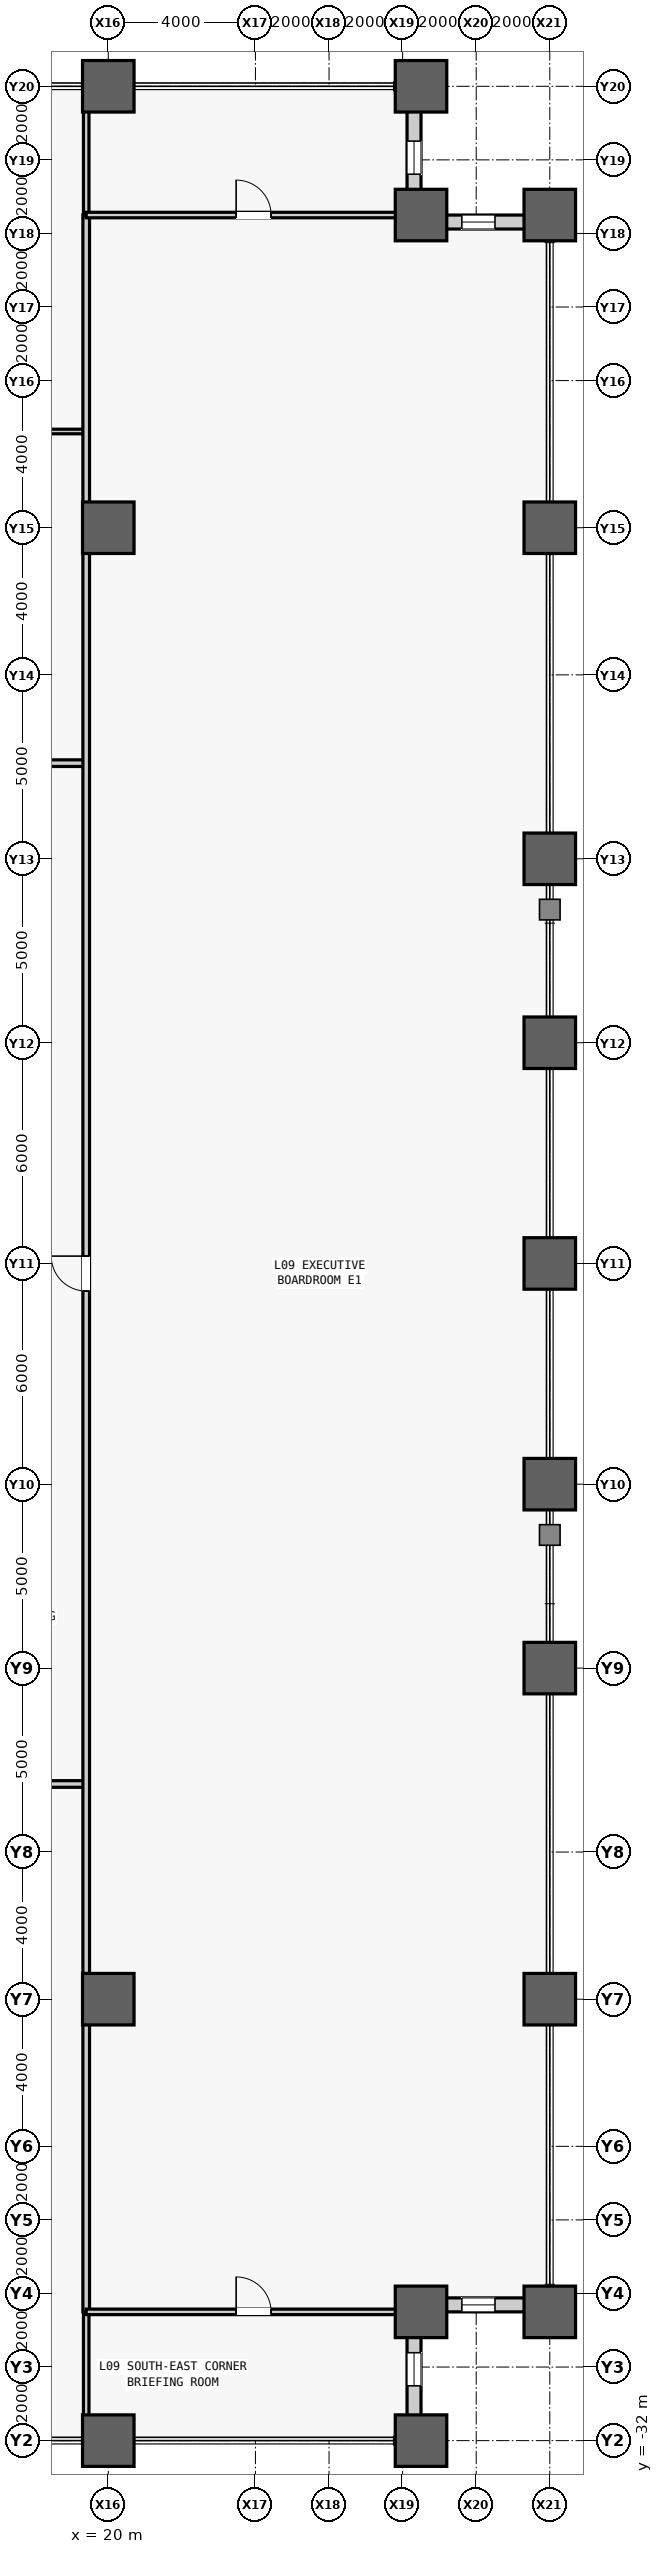
"""IFC4 building model, lengths in metres.
Left out: names, types, materials, properties, quantities, classifications, styles, units other than length and angle.
Written with IfcOpenShell. Run it as: python <this file> out.ifc"""

import sys

from ifc_helpers import new_model, si_unit, direction, frame, frame_2d, origin, origin_2d, place, context, subcontext, project, spatial, rectangle, hollow_rectangle, extrude, source, transform, mapped, element, fill, save


model = new_model("IFC4")
c1 = context("Model", 3, precision=1e-05, world=origin(), true_north=direction((0.0, 1.0)))
c2 = subcontext(c1, "Body", "Model", "MODEL_VIEW")
j1 = project(units=[si_unit("LENGTHUNIT", "METRE"), si_unit("PLANEANGLEUNIT", "RADIAN")], contexts=[c1])
p1 = place(None, origin())
s1 = spatial("IfcSite", under=j1, at=p1, CompositionType="ELEMENT")
p2 = place(p1, origin())
s2 = spatial("IfcBuilding", under=s1, at=p2, CompositionType="ELEMENT")
p3 = place(p2, frame((0.0, 0.0, 45.2)))
s3 = spatial("IfcBuildingStorey", under=s2, at=p3, CompositionType="ELEMENT", Elevation=45.2)
m1 = source(origin(), c2, "Body", "SweptSolid", [
    extrude(hollow_rectangle(XDim=1.4, YDim=1.4, WallThickness=0.075, at=origin_2d()), origin(), (0.0, 0.0, 1.0), 4.2),
])
for number, where, z_axis, x_axis in (
    (1, (20.0, -32.0, 0.0), (0.0, 0.0, 1.0), (1.0, 0.0, 0.0)),
    (2, (20.0, -20.0, 0.0), (0.0, 0.0, 1.0), (1.0, 0.0, 0.0)),
    (3, (20.0, 20.0, 0.0), (0.0, 0.0, 1.0), (1.0, 0.0, 0.0)),
    (4, (20.0, 32.0, 0.0), (0.0, 0.0, 1.0), (1.0, 0.0, 0.0)),
    (5, (28.5, -32.0, 0.0), (0.0, 0.0, 1.0), (1.0, 0.0, 0.0)),
    (6, (28.5, -28.5, 0.0), (0.0, 0.0, 1.0), (1.0, 0.0, 0.0)),
    (7, (28.5, 28.5, 0.0), (0.0, 0.0, 1.0), (1.0, 0.0, 0.0)),
    (8, (28.5, 32.0, 0.0), (0.0, 0.0, 1.0), (1.0, 0.0, 0.0)),
    (9, (32.0, -28.5, 0.0), (0.0, 0.0, 1.0), (1.0, 0.0, 0.0)),
    (10, (32.0, -20.0, 0.0), (0.0, 0.0, 1.0), (1.0, 0.0, 0.0)),
    (11, (32.0, -11.0, 0.0), (0.0, 0.0, 1.0), (1.0, 0.0, 0.0)),
    (12, (32.0, -6.0, 0.0), (0.0, 0.0, 1.0), (1.0, 0.0, 0.0)),
    (13, (32.0, 0.0, 0.0), (0.0, 0.0, 1.0), (1.0, 0.0, 0.0)),
    (14, (32.0, 6.0, 0.0), (0.0, 0.0, 1.0), (1.0, 0.0, 0.0)),
    (15, (32.0, 11.0, 0.0), (0.0, 0.0, 1.0), (1.0, 0.0, 0.0)),
    (16, (32.0, 20.0, 0.0), (0.0, 0.0, 1.0), (1.0, 0.0, 0.0)),
    (17, (32.0, 28.5, 0.0), (0.0, 0.0, 1.0), (1.0, 0.0, 0.0)),
):
    element("IfcColumn", number, at=place(p3, frame(where, z_axis=z_axis, x_axis=x_axis)), inside=s3, PredefinedType="COLUMN", context=c2, shape_type="MappedRepresentation", body=[
        mapped(m1, transform((0.0, 0.0, 0.0), scale=1.0)),
    ])
m2 = source(origin(), c2, "Body", "SweptSolid", [
    extrude(rectangle(XDim=3.12, YDim=0.38, at=frame_2d((1.56, 0.0))), origin(), (0.0, 0.0, 1.0), 3.245),
])
p4 = place(p3, frame((28.31, -31.62, 0.0), z_axis=(0.0, 0.0, 1.0), x_axis=(0.0, 1.0, 0.0)))
e18 = element("IfcWall", 18, at=p4, inside=s3, PredefinedType="STANDARD", context=c2, shape_type="MappedRepresentation", body=[
    mapped(m2, transform((0.0, 0.0, 0.0), scale=1.0)),
])
m3 = source(origin(), c2, "Body", "SweptSolid", [
    extrude(rectangle(XDim=0.9, YDim=2.4, at=frame_2d((0.45, 1.2))), frame((0.0, 0.2, 0.0), z_axis=(0.0, -1.0, 0.0), x_axis=(1.0, 0.0, 0.0)), (0.0, 0.0, 1.0), 0.4),
])
p5 = place(p4, frame((1.11, 0.0, 0.5)))
e19 = element("IfcOpeningElement", 19, at=p5, cuts=e18, PredefinedType="OPENING", context=c2, shape_type="MappedRepresentation", body=[
    mapped(m3, transform((0.0, 0.0, 0.0), scale=1.0)),
])
p6 = place(p3, frame((28.5, -28.31, 0.0), z_axis=(0.0, 0.0, 1.0), x_axis=(1.0, 0.0, 0.0)))
e20 = element("IfcWall", 20, at=p6, inside=s3, PredefinedType="STANDARD", context=c2, shape_type="MappedRepresentation", body=[
    mapped(m2, transform((0.0, 0.0, 0.0), scale=1.0)),
])
p7 = place(p6, frame((1.11, 0.0, 0.5)))
e21 = element("IfcOpeningElement", 21, at=p7, cuts=e20, PredefinedType="OPENING", context=c2, shape_type="MappedRepresentation", body=[
    mapped(m3, transform((0.0, 0.0, 0.0), scale=1.0)),
])
p8 = place(p3, frame((28.5, 28.31, 0.0), z_axis=(0.0, 0.0, 1.0), x_axis=(1.0, 0.0, 0.0)))
e22 = element("IfcWall", 22, at=p8, inside=s3, PredefinedType="STANDARD", context=c2, shape_type="MappedRepresentation", body=[
    mapped(m2, transform((0.0, 0.0, 0.0), scale=1.0)),
])
p9 = place(p8, frame((1.11, 0.0, 0.5)))
e23 = element("IfcOpeningElement", 23, at=p9, cuts=e22, PredefinedType="OPENING", context=c2, shape_type="MappedRepresentation", body=[
    mapped(m3, transform((0.0, 0.0, 0.0), scale=1.0)),
])
p10 = place(p3, frame((28.31, 28.5, 0.0), z_axis=(0.0, 0.0, 1.0), x_axis=(0.0, 1.0, 0.0)))
e24 = element("IfcWall", 24, at=p10, inside=s3, PredefinedType="STANDARD", context=c2, shape_type="MappedRepresentation", body=[
    mapped(m2, transform((0.0, 0.0, 0.0), scale=1.0)),
])
p11 = place(p10, frame((1.11, 0.0, 0.5)))
e25 = element("IfcOpeningElement", 25, at=p11, cuts=e24, PredefinedType="OPENING", context=c2, shape_type="MappedRepresentation", body=[
    mapped(m3, transform((0.0, 0.0, 0.0), scale=1.0)),
])
m4 = source(origin(), c2, "Body", "SweptSolid", [
    extrude(rectangle(XDim=37.95, YDim=0.18, at=frame_2d((18.975, 0.0))), origin(), (0.0, 0.0, 1.0), 3.94),
])
p12 = place(p3, frame((-18.55, -14.15, 0.0), z_axis=(0.0, 0.0, 1.0), x_axis=(1.0, 0.0, 0.0)))
e26 = element("IfcWall", 26, at=p12, inside=s3, PredefinedType="PARTITIONING", context=c2, shape_type="MappedRepresentation", body=[
    mapped(m4, transform((0.0, 0.0, 0.0), scale=1.0)),
])
m5 = source(origin(), c2, "Body", "SweptSolid", [
    extrude(rectangle(XDim=1.05, YDim=2.2, at=frame_2d((0.525, 1.1))), frame((0.0, 0.1, 0.0), z_axis=(0.0, -1.0, 0.0), x_axis=(1.0, 0.0, 0.0)), (0.0, 0.0, 1.0), 0.2),
])
p13 = place(p12, frame((5.345, 0.0, 0.0)))
e27 = element("IfcOpeningElement", 27, at=p13, cuts=e26, PredefinedType="OPENING", context=c2, shape_type="MappedRepresentation", body=[
    mapped(m5, transform((0.0, 0.0, 0.0), scale=1.0)),
])
p14 = place(p12, frame((11.809, 0.0, 0.0)))
e28 = element("IfcOpeningElement", 28, at=p14, cuts=e26, PredefinedType="OPENING", context=c2, shape_type="MappedRepresentation", body=[
    mapped(m5, transform((0.0, 0.0, 0.0), scale=1.0)),
])
p15 = place(p12, frame((21.296, 0.0, 0.0)))
e29 = element("IfcOpeningElement", 29, at=p15, cuts=e26, PredefinedType="OPENING", context=c2, shape_type="MappedRepresentation", body=[
    mapped(m5, transform((0.0, 0.0, 0.0), scale=1.0)),
])
p16 = place(p12, frame((29.076, 0.0, 0.0)))
e30 = element("IfcOpeningElement", 30, at=p16, cuts=e26, PredefinedType="OPENING", context=c2, shape_type="MappedRepresentation", body=[
    mapped(m5, transform((0.0, 0.0, 0.0), scale=1.0)),
])
m6 = source(origin(), c2, "Body", "SweptSolid", [
    extrude(rectangle(XDim=37.95, YDim=0.125, at=frame_2d((18.975, 0.0))), origin(), (0.0, 0.0, 1.0), 3.94),
])
p17 = place(p3, frame((-18.55, 22.616, 0.0), z_axis=(0.0, 0.0, 1.0), x_axis=(1.0, 0.0, 0.0)))
e31 = element("IfcWall", 31, at=p17, inside=s3, PredefinedType="PARTITIONING", context=c2, shape_type="MappedRepresentation", body=[
    mapped(m6, transform((0.0, 0.0, 0.0), scale=1.0)),
])
m7 = source(origin(), c2, "Body", "SweptSolid", [
    extrude(rectangle(XDim=0.95, YDim=2.15, at=frame_2d((0.475, 1.075))), frame((0.0, 0.073, 0.0), z_axis=(0.0, -1.0, 0.0), x_axis=(1.0, 0.0, 0.0)), (0.0, 0.0, 1.0), 0.145),
])
p18 = place(p17, frame((18.5, 0.0, 0.0)))
e32 = element("IfcOpeningElement", 32, at=p18, cuts=e31, PredefinedType="OPENING", context=c2, shape_type="MappedRepresentation", body=[
    mapped(m7, transform((0.0, 0.0, 0.0), scale=1.0)),
])
p19 = place(p3, frame((-18.55, 13.6, 0.0), z_axis=(0.0, 0.0, 1.0), x_axis=(1.0, 0.0, 0.0)))
e33 = element("IfcWall", 33, at=p19, inside=s3, PredefinedType="PARTITIONING", context=c2, shape_type="MappedRepresentation", body=[
    mapped(m4, transform((0.0, 0.0, 0.0), scale=1.0)),
])
p20 = place(p19, frame((18.025, 0.0, 0.0)))
e34 = element("IfcOpeningElement", 34, at=p20, cuts=e33, PredefinedType="OPENING", context=c2, shape_type="MappedRepresentation", body=[
    mapped(m5, transform((0.0, 0.0, 0.0), scale=1.0)),
])
m8 = source(origin(), c2, "Body", "SweptSolid", [
    extrude(rectangle(XDim=3.5, YDim=0.15, at=frame_2d((1.75, 0.0))), origin(), (0.0, 0.0, 1.0), 3.94),
])
for number, where, z_axis, x_axis in (
    (35, (19.4, -32.0, 0.0), (0.0, 0.0, 1.0), (0.0, 1.0, 0.0)),
    (36, (19.4, 28.5, 0.0), (0.0, 0.0, 1.0), (0.0, 1.0, 0.0)),
):
    element("IfcWall", number, at=place(p3, frame(where, z_axis=z_axis, x_axis=x_axis)), inside=s3, PredefinedType="PARTITIONING", context=c2, shape_type="MappedRepresentation", body=[
        mapped(m8, transform((0.0, 0.0, 0.0), scale=1.0)),
    ])
m9 = source(origin(), c2, "Body", "SweptSolid", [
    extrude(rectangle(XDim=57.0, YDim=0.18, at=frame_2d((28.5, 0.0))), origin(), (0.0, 0.0, 1.0), 3.471),
])
p21 = place(p3, frame((19.4, -28.5, 0.0), z_axis=(0.0, 0.0, 1.0), x_axis=(0.0, 1.0, 0.0)))
e37 = element("IfcWall", 37, at=p21, inside=s3, PredefinedType="PARTITIONING", context=c2, shape_type="MappedRepresentation", body=[
    mapped(m9, transform((0.0, 0.0, 0.0), scale=1.0)),
])
m10 = source(origin(), c2, "Body", "SweptSolid", [
    extrude(rectangle(XDim=0.95, YDim=2.15, at=frame_2d((0.475, 1.075))), frame((0.0, 0.1, 0.0), z_axis=(0.0, -1.0, 0.0), x_axis=(1.0, 0.0, 0.0)), (0.0, 0.0, 1.0), 0.2),
])
p22 = place(p21, frame((27.75, 0.0, 0.0)))
e38 = element("IfcOpeningElement", 38, at=p22, cuts=e37, PredefinedType="OPENING", context=c2, shape_type="MappedRepresentation", body=[
    mapped(m10, transform((0.0, 0.0, 0.0), scale=1.0)),
])
m11 = source(origin(), c2, "Body", "SweptSolid", [
    extrude(rectangle(XDim=9.1, YDim=0.15, at=frame_2d((4.55, 0.0))), origin(), (0.0, 0.0, 1.0), 3.94),
])
p23 = place(p3, frame((19.4, -28.5, 0.0), z_axis=(0.0, 0.0, 1.0), x_axis=(1.0, 0.0, 0.0)))
e39 = element("IfcWall", 39, at=p23, inside=s3, PredefinedType="PARTITIONING", context=c2, shape_type="MappedRepresentation", body=[
    mapped(m11, transform((0.0, 0.0, 0.0), scale=1.0)),
])
m12 = source(origin(), c2, "Body", "SweptSolid", [
    extrude(rectangle(XDim=0.95, YDim=2.15, at=frame_2d((0.475, 1.075))), frame((0.0, 0.085, 0.0), z_axis=(0.0, -1.0, 0.0), x_axis=(1.0, 0.0, 0.0)), (0.0, 0.0, 1.0), 0.17),
])
p24 = place(p23, frame((4.075, 0.0, 0.0)))
e40 = element("IfcOpeningElement", 40, at=p24, cuts=e39, PredefinedType="OPENING", context=c2, shape_type="MappedRepresentation", body=[
    mapped(m12, transform((0.0, 0.0, 0.0), scale=1.0)),
])
p25 = place(p3, frame((19.4, 28.5, 0.0), z_axis=(0.0, 0.0, 1.0), x_axis=(1.0, 0.0, 0.0)))
e41 = element("IfcWall", 41, at=p25, inside=s3, PredefinedType="PARTITIONING", context=c2, shape_type="MappedRepresentation", body=[
    mapped(m11, transform((0.0, 0.0, 0.0), scale=1.0)),
])
p26 = place(p25, frame((4.075, 0.0, 0.0)))
e42 = element("IfcOpeningElement", 42, at=p26, cuts=e41, PredefinedType="OPENING", context=c2, shape_type="MappedRepresentation", body=[
    mapped(m12, transform((0.0, 0.0, 0.0), scale=1.0)),
])
m13 = source(origin(), c2, "Body", "SweptSolid", [
    extrude(rectangle(XDim=0.9, YDim=2.4, at=frame_2d((0.45, 1.2))), frame((0.0, 0.03, 0.0), z_axis=(0.0, -1.0, 0.0), x_axis=(1.0, 0.0, 0.0)), (0.0, 0.0, 1.0), 0.06),
])
p27 = place(p5, origin())
e43 = element("IfcWindow", 43, at=p27, inside=s3, PartitioningType="SINGLE_PANEL", PredefinedType="WINDOW", context=c2, shape_type="MappedRepresentation", body=[
    mapped(m13, transform((0.0, 0.0, 0.0), scale=1.0)),
])
fill(e19, e43)
p28 = place(p7, origin())
e44 = element("IfcWindow", 44, at=p28, inside=s3, PartitioningType="SINGLE_PANEL", PredefinedType="WINDOW", context=c2, shape_type="MappedRepresentation", body=[
    mapped(m13, transform((0.0, 0.0, 0.0), scale=1.0)),
])
fill(e21, e44)
p29 = place(p9, origin())
e45 = element("IfcWindow", 45, at=p29, inside=s3, PartitioningType="SINGLE_PANEL", PredefinedType="WINDOW", context=c2, shape_type="MappedRepresentation", body=[
    mapped(m13, transform((0.0, 0.0, 0.0), scale=1.0)),
])
fill(e23, e45)
p30 = place(p11, origin())
e46 = element("IfcWindow", 46, at=p30, inside=s3, PartitioningType="SINGLE_PANEL", PredefinedType="WINDOW", context=c2, shape_type="MappedRepresentation", body=[
    mapped(m13, transform((0.0, 0.0, 0.0), scale=1.0)),
])
fill(e25, e46)
m14 = source(origin(), c2, "Body", "SweptSolid", [
    extrude(rectangle(XDim=0.95, YDim=2.15, at=frame_2d((0.475, 1.075))), frame((0.0, 0.025, 0.0), z_axis=(0.0, -1.0, 0.0), x_axis=(1.0, 0.0, 0.0)), (0.0, 0.0, 1.0), 0.05),
])
p31 = place(p22, origin())
e47 = element("IfcDoor", 47, at=p31, inside=s3, OperationType="SINGLE_SWING_RIGHT", PredefinedType="DOOR", context=c2, shape_type="MappedRepresentation", body=[
    mapped(m14, transform((0.0, 0.0, 0.0), scale=1.0)),
])
fill(e38, e47)
p32 = place(p24, origin())
e48 = element("IfcDoor", 48, at=p32, inside=s3, OperationType="SINGLE_SWING_LEFT", PredefinedType="DOOR", context=c2, shape_type="MappedRepresentation", body=[
    mapped(m14, transform((0.0, 0.0, 0.0), scale=1.0)),
])
fill(e40, e48)
p33 = place(p26, origin())
e49 = element("IfcDoor", 49, at=p33, inside=s3, OperationType="SINGLE_SWING_LEFT", PredefinedType="DOOR", context=c2, shape_type="MappedRepresentation", body=[
    mapped(m14, transform((0.0, 0.0, 0.0), scale=1.0)),
])
fill(e42, e49)
save(model, sys.argv[1])
